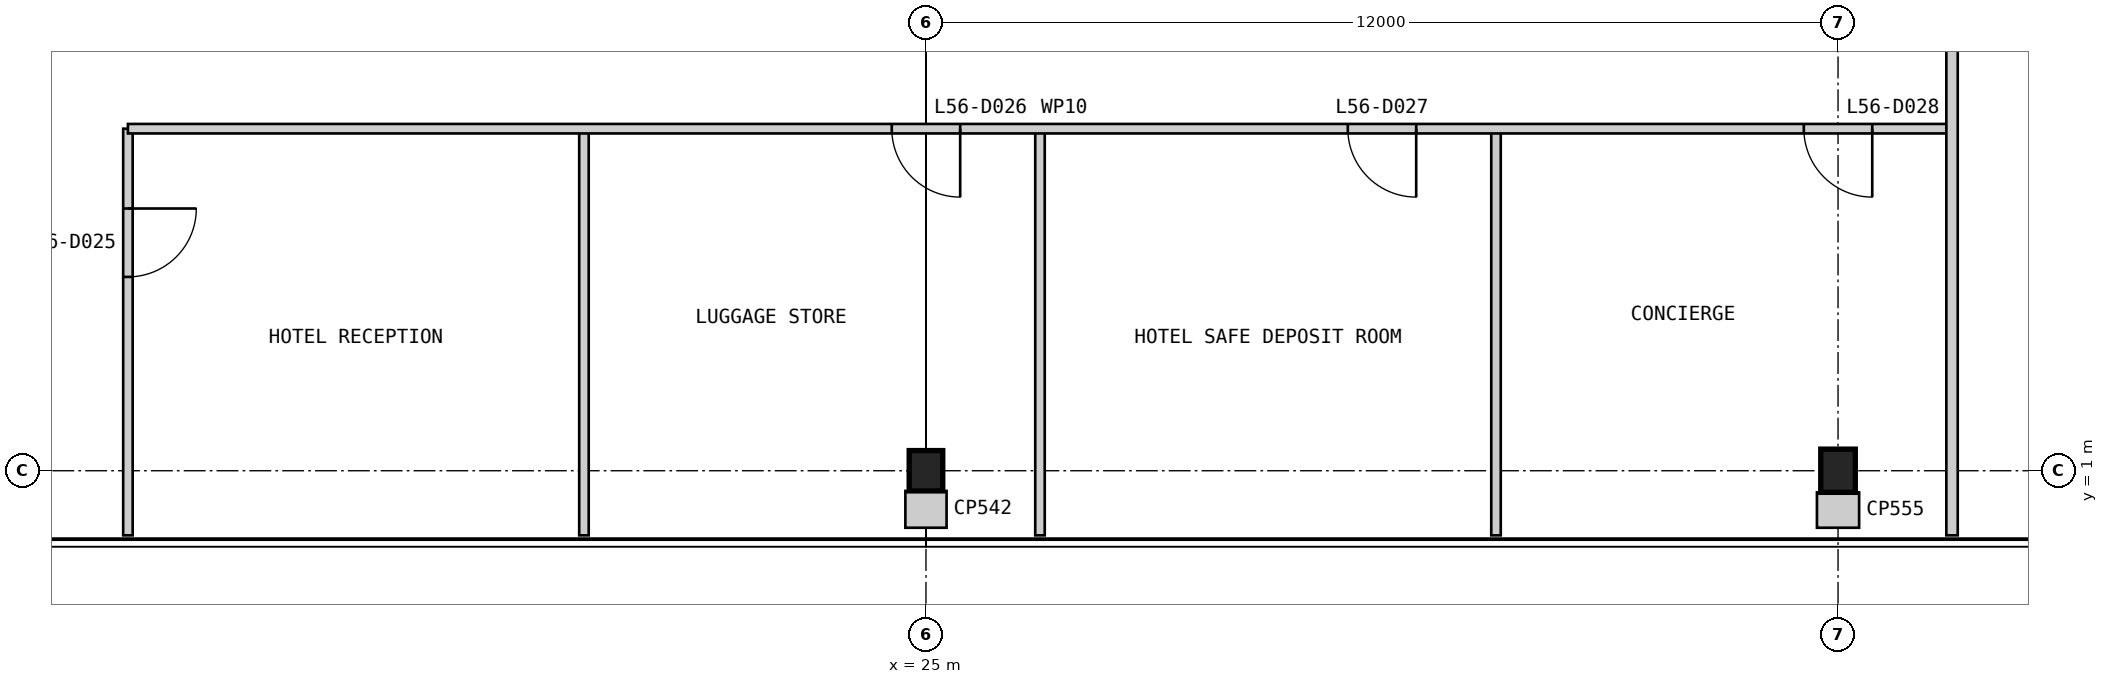
"""IFC4 building model, lengths in metres.
Left out: names, types, materials, properties, quantities, classifications, styles, units other than length and angle.
Written with IfcOpenShell. Run it as: python <this file> out.ifc"""

import sys

from ifc_helpers import new_model, si_unit, direction, frame, frame_2d, origin, origin_2d, place, context, subcontext, project, spatial, rectangle, i_section, extrude, element, fill, save


model = new_model("IFC4")
c1 = context("Model", 3, precision=1e-05, world=origin(), true_north=direction((0.0, 1.0)))
c2 = subcontext(c1, "Body", "Model", "MODEL_VIEW")
j1 = project(units=[si_unit("LENGTHUNIT", "METRE"), si_unit("PLANEANGLEUNIT", "RADIAN")], contexts=[c1])
p1 = place(None, origin())
s1 = spatial("IfcSite", under=j1, at=p1, CompositionType="ELEMENT")
p2 = place(p1, origin())
s2 = spatial("IfcBuilding", under=s1, at=p2, CompositionType="ELEMENT")
p3 = place(p2, frame((0.0, 0.0, 239.8)))
s3 = spatial("IfcBuildingStorey", under=s2, at=p3, CompositionType="ELEMENT", Elevation=239.8)
p4 = place(p3, frame((25.0, 1.0, 0.0), z_axis=(0.0, 0.0, 1.0), x_axis=(1.0, 0.0, 0.0)))
e1 = element("IfcColumn", 1, at=p4, inside=s3, PredefinedType="COLUMN", context=c2, shape_type="SweptSolid", body=[
    extrude(i_section(OverallWidth=0.442, OverallDepth=0.531, WebThickness=0.066, FlangeThickness=0.106, at=origin_2d()), origin(), (0.0, 0.0, 1.0), 6.0),
])
p5 = place(p3, frame((37.0, 1.0, 0.0), z_axis=(0.0, 0.0, 1.0), x_axis=(1.0, 0.0, 0.0)))
e2 = element("IfcColumn", 2, at=p5, inside=s3, PredefinedType="COLUMN", context=c2, shape_type="SweptSolid", body=[
    extrude(i_section(OverallWidth=0.455, OverallDepth=0.569, WebThickness=0.078, FlangeThickness=0.125, at=origin_2d()), origin(), (0.0, 0.0, 1.0), 6.0),
])
p6 = place(p3, frame((14.5, 0.15, 0.0), z_axis=(0.0, 0.0, 1.0), x_axis=(0.0, 1.0, 0.0)))
e3 = element("IfcWall", 3, at=p6, inside=s3, PredefinedType="PARTITIONING", context=c2, shape_type="SweptSolid", body=[
    extrude(rectangle(XDim=5.35, YDim=0.125, at=frame_2d((2.675, 0.0))), origin(), (0.0, 0.0, 1.0), 5.85),
])
p7 = place(p6, frame((3.4, 0.0, 0.0)))
e4 = element("IfcOpeningElement", 4, at=p7, cuts=e3, PredefinedType="OPENING", context=c2, shape_type="SweptSolid", body=[
    extrude(rectangle(XDim=0.9, YDim=2.2, at=frame_2d((0.45, 1.1))), frame((0.0, 0.073, 0.0), z_axis=(0.0, -1.0, 0.0), x_axis=(1.0, 0.0, 0.0)), (0.0, 0.0, 1.0), 0.145),
])
for number, where, z_axis, x_axis in (
    (5, (20.5, 0.15, 0.0), (0.0, 0.0, 1.0), (0.0, 1.0, 0.0)),
    (6, (26.5, 0.15, 0.0), (0.0, 0.0, 1.0), (0.0, 1.0, 0.0)),
    (7, (32.5, 0.15, 0.0), (0.0, 0.0, 1.0), (0.0, 1.0, 0.0)),
):
    element("IfcWall", number, at=place(p3, frame(where, z_axis=z_axis, x_axis=x_axis)), inside=s3, PredefinedType="PARTITIONING", context=c2, shape_type="SweptSolid", body=[
        extrude(rectangle(XDim=5.35, YDim=0.125, at=frame_2d((2.675, 0.0))), origin(), (0.0, 0.0, 1.0), 5.85),
    ])
p8 = place(p3, frame((14.5, 5.5, 0.0), z_axis=(0.0, 0.0, 1.0), x_axis=(1.0, 0.0, 0.0)))
e8 = element("IfcWall", 8, at=p8, inside=s3, PredefinedType="PARTITIONING", context=c2, shape_type="SweptSolid", body=[
    extrude(rectangle(XDim=24.0, YDim=0.125, at=frame_2d((12.0, 0.0))), origin(), (0.0, 0.0, 1.0), 5.85),
])
p9 = place(p8, frame((10.05, 0.0, 0.0)))
e9 = element("IfcOpeningElement", 9, at=p9, cuts=e8, PredefinedType="OPENING", context=c2, shape_type="SweptSolid", body=[
    extrude(rectangle(XDim=0.9, YDim=2.2, at=frame_2d((0.45, 1.1))), frame((0.0, 0.073, 0.0), z_axis=(0.0, -1.0, 0.0), x_axis=(1.0, 0.0, 0.0)), (0.0, 0.0, 1.0), 0.145),
])
p10 = place(p8, frame((16.05, 0.0, 0.0)))
e10 = element("IfcOpeningElement", 10, at=p10, cuts=e8, PredefinedType="OPENING", context=c2, shape_type="SweptSolid", body=[
    extrude(rectangle(XDim=0.9, YDim=2.2, at=frame_2d((0.45, 1.1))), frame((0.0, 0.073, 0.0), z_axis=(0.0, -1.0, 0.0), x_axis=(1.0, 0.0, 0.0)), (0.0, 0.0, 1.0), 0.145),
])
p11 = place(p8, frame((22.05, 0.0, 0.0)))
e11 = element("IfcOpeningElement", 11, at=p11, cuts=e8, PredefinedType="OPENING", context=c2, shape_type="SweptSolid", body=[
    extrude(rectangle(XDim=0.9, YDim=2.2, at=frame_2d((0.45, 1.1))), frame((0.0, 0.073, 0.0), z_axis=(0.0, -1.0, 0.0), x_axis=(1.0, 0.0, 0.0)), (0.0, 0.0, 1.0), 0.145),
])
p12 = place(p3, frame((38.5, 0.15, 0.0), z_axis=(0.0, 0.0, 1.0), x_axis=(0.0, 1.0, 0.0)))
e12 = element("IfcWall", 12, at=p12, inside=s3, PredefinedType="PARTITIONING", context=c2, shape_type="SweptSolid", body=[
    extrude(rectangle(XDim=11.35, YDim=0.15, at=frame_2d((5.675, 0.0))), origin(), (0.0, 0.0, 1.0), 5.85),
])
p13 = place(p3, frame((25.0, 0.25, 0.0), z_axis=(0.0, 0.0, 1.0), x_axis=(0.0, 1.0, 0.0)))
e13 = element("IfcWall", 13, at=p13, inside=s3, PredefinedType="PARTITIONING", context=c2, shape_type="SweptSolid", body=[
    extrude(rectangle(XDim=0.485, YDim=0.542, at=frame_2d((0.242, 0.0))), origin(), (0.0, 0.0, 1.0), 5.85),
])
p14 = place(p3, frame((37.0, 0.25, 0.0), z_axis=(0.0, 0.0, 1.0), x_axis=(0.0, 1.0, 0.0)))
e14 = element("IfcWall", 14, at=p14, inside=s3, PredefinedType="PARTITIONING", context=c2, shape_type="SweptSolid", body=[
    extrude(rectangle(XDim=0.466, YDim=0.555, at=frame_2d((0.233, 0.0))), origin(), (0.0, 0.0, 1.0), 5.85),
])
p15 = place(p7, frame((0.9, 0.0, 0.0), z_axis=(0.0, 0.0, 1.0), x_axis=(-1.0, 0.0, 0.0)))
e15 = element("IfcDoor", 15, at=p15, inside=s3, OperationType="SINGLE_SWING_LEFT", PredefinedType="DOOR", context=c2, shape_type="SweptSolid", body=[
    extrude(rectangle(XDim=0.9, YDim=2.2, at=frame_2d((0.45, 1.1))), frame((0.0, 0.025, 0.0), z_axis=(0.0, -1.0, 0.0), x_axis=(1.0, 0.0, 0.0)), (0.0, 0.0, 1.0), 0.05),
])
fill(e4, e15)
p16 = place(p9, frame((0.9, 0.0, 0.0), z_axis=(0.0, 0.0, 1.0), x_axis=(-1.0, 0.0, 0.0)))
e16 = element("IfcDoor", 16, at=p16, inside=s3, OperationType="SINGLE_SWING_LEFT", PredefinedType="DOOR", context=c2, shape_type="SweptSolid", body=[
    extrude(rectangle(XDim=0.9, YDim=2.2, at=frame_2d((0.45, 1.1))), frame((0.0, 0.025, 0.0), z_axis=(0.0, -1.0, 0.0), x_axis=(1.0, 0.0, 0.0)), (0.0, 0.0, 1.0), 0.05),
])
fill(e9, e16)
p17 = place(p10, frame((0.9, 0.0, 0.0), z_axis=(0.0, 0.0, 1.0), x_axis=(-1.0, 0.0, 0.0)))
e17 = element("IfcDoor", 17, at=p17, inside=s3, OperationType="SINGLE_SWING_LEFT", PredefinedType="DOOR", context=c2, shape_type="SweptSolid", body=[
    extrude(rectangle(XDim=0.9, YDim=2.2, at=frame_2d((0.45, 1.1))), frame((0.0, 0.025, 0.0), z_axis=(0.0, -1.0, 0.0), x_axis=(1.0, 0.0, 0.0)), (0.0, 0.0, 1.0), 0.05),
])
fill(e10, e17)
p18 = place(p11, frame((0.9, 0.0, 0.0), z_axis=(0.0, 0.0, 1.0), x_axis=(-1.0, 0.0, 0.0)))
e18 = element("IfcDoor", 18, at=p18, inside=s3, OperationType="SINGLE_SWING_LEFT", PredefinedType="DOOR", context=c2, shape_type="SweptSolid", body=[
    extrude(rectangle(XDim=0.9, YDim=2.2, at=frame_2d((0.45, 1.1))), frame((0.0, 0.025, 0.0), z_axis=(0.0, -1.0, 0.0), x_axis=(1.0, 0.0, 0.0)), (0.0, 0.0, 1.0), 0.05),
])
fill(e11, e18)
save(model, sys.argv[1])
